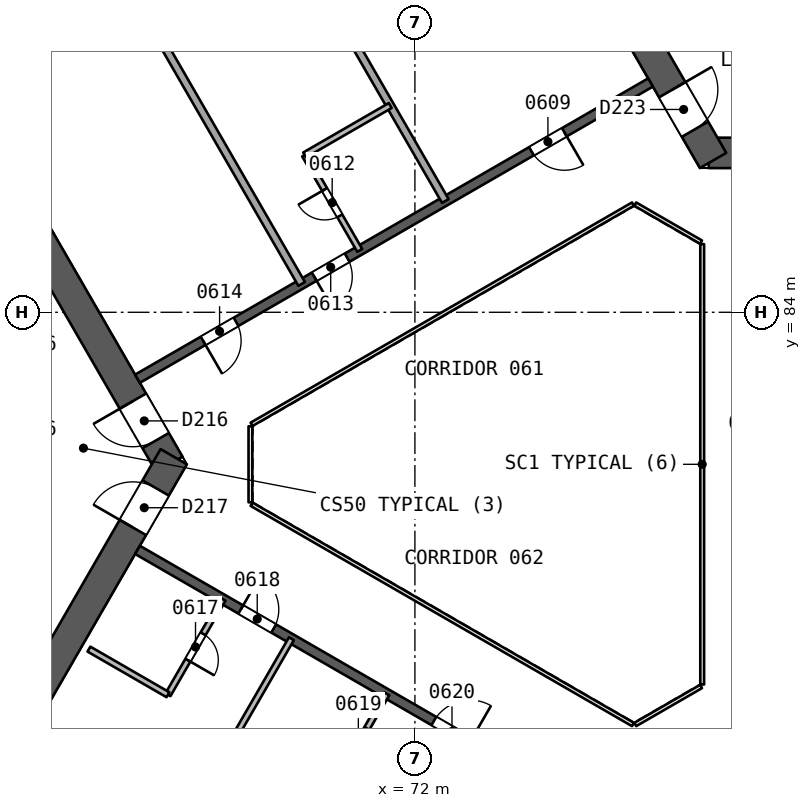
"""IFC4 building model, lengths in metres.
Left out: names, types, materials, properties, quantities, classifications, styles, units other than length and angle.
Written with IfcOpenShell. Run it as: python <this file> out.ifc"""

import sys

from ifc_helpers import new_model, si_unit, direction, frame, frame_2d, origin, place, context, subcontext, project, spatial, rectangle, extrude, element, fill, save


model = new_model("IFC4")
c1 = context("Model", 3, precision=1e-05, world=origin(), true_north=direction((0.0, 1.0)))
c2 = subcontext(c1, "Body", "Model", "MODEL_VIEW")
j1 = project(units=[si_unit("LENGTHUNIT", "METRE"), si_unit("PLANEANGLEUNIT", "RADIAN")], contexts=[c1])
p1 = place(None, origin())
s1 = spatial("IfcSite", under=j1, at=p1, CompositionType="ELEMENT")
p2 = place(p1, origin())
s2 = spatial("IfcBuilding", under=s1, at=p2, CompositionType="ELEMENT")
p3 = place(p2, frame((0.0, 0.0, 33.7)))
s3 = spatial("IfcBuildingStorey", under=s2, at=p3, CompositionType="ELEMENT", Elevation=33.7)
p4 = place(p3, frame((65.538, 80.0, 0.0), z_axis=(0.0, 0.0, 1.0), x_axis=(-0.49999662545, 0.866027352073, 0.0)))
e1 = element("IfcWall", 1, at=p4, inside=s3, PredefinedType="SHEAR", context=c2, shape_type="SweptSolid", body=[
    extrude(rectangle(XDim=10.149, YDim=0.8, at=frame_2d((5.074, 0.0))), origin(), (0.0, 0.0, 1.0), 3.7),
])
p5 = place(p4, frame((0.719, 0.0, 0.0)))
e2 = element("IfcOpeningElement", 2, at=p5, cuts=e1, PredefinedType="OPENING", context=c2, shape_type="SweptSolid", body=[
    extrude(rectangle(XDim=1.2, YDim=2.1, at=frame_2d((0.6, 1.05))), frame((0.0, 0.411, 0.0), z_axis=(0.0, -1.0, 0.0), x_axis=(1.0, 0.0, 0.0)), (0.0, 0.0, 1.0), 0.821),
])
p6 = place(p3, frame((60.664, 71.557, 0.0), z_axis=(0.0, 0.0, 1.0), x_axis=(0.50000409368, 0.866023040284, 0.0)))
e3 = element("IfcWall", 3, at=p6, inside=s3, PredefinedType="SHEAR", context=c2, shape_type="SweptSolid", body=[
    extrude(rectangle(XDim=9.98, YDim=0.8, at=frame_2d((4.99, 0.0))), origin(), (0.0, 0.0, 1.0), 3.7),
])
p7 = place(p6, frame((7.83, 0.0, 0.0)))
e4 = element("IfcOpeningElement", 4, at=p7, cuts=e3, PredefinedType="OPENING", context=c2, shape_type="SweptSolid", body=[
    extrude(rectangle(XDim=1.2, YDim=2.1, at=frame_2d((0.6, 1.05))), frame((0.0, 0.411, 0.0), z_axis=(0.0, -1.0, 0.0), x_axis=(1.0, 0.0, 0.0)), (0.0, 0.0, 1.0), 0.821),
])
p8 = place(p3, frame((79.731, 88.194, 0.0), z_axis=(0.0, 0.0, 1.0), x_axis=(1.0, 0.0, 0.0)))
e5 = element("IfcWall", 5, at=p8, inside=s3, PredefinedType="SHEAR", context=c2, shape_type="SweptSolid", body=[
    extrude(rectangle(XDim=10.149, YDim=0.8, at=frame_2d((5.074, 0.0))), origin(), (0.0, 0.0, 1.0), 3.7),
])
p9 = place(p8, frame((0.719, 0.0, 0.0)))
e6 = element("IfcOpeningElement", 6, at=p9, cuts=e5, PredefinedType="OPENING", context=c2, shape_type="SweptSolid", body=[
    extrude(rectangle(XDim=1.2, YDim=2.1, at=frame_2d((0.6, 1.05))), frame((0.0, 0.411, 0.0), z_axis=(0.0, -1.0, 0.0), x_axis=(1.0, 0.0, 0.0)), (0.0, 0.0, 1.0), 0.821),
])
p10 = place(p3, frame((74.856, 96.637, 0.0), z_axis=(0.0, 0.0, 1.0), x_axis=(0.499993500917, -0.866029155999, 0.0)))
e7 = element("IfcWall", 7, at=p10, inside=s3, PredefinedType="SHEAR", context=c2, shape_type="SweptSolid", body=[
    extrude(rectangle(XDim=9.98, YDim=0.8, at=frame_2d((4.99, 0.0))), origin(), (0.0, 0.0, 1.0), 3.7),
])
p11 = place(p10, frame((7.83, 0.0, 0.0)))
e8 = element("IfcOpeningElement", 8, at=p11, cuts=e7, PredefinedType="OPENING", context=c2, shape_type="SweptSolid", body=[
    extrude(rectangle(XDim=1.2, YDim=2.1, at=frame_2d((0.6, 1.05))), frame((0.0, 0.411, 0.0), z_axis=(0.0, -1.0, 0.0), x_axis=(1.0, 0.0, 0.0)), (0.0, 0.0, 1.0), 0.821),
])
p12 = place(p3, frame((78.2, 90.046, 0.0), z_axis=(0.0, 0.0, 1.0), x_axis=(-0.866026492143, -0.499998114903, 0.0)))
e9 = element("IfcWall", 9, at=p12, inside=s3, PredefinedType="SHEAR", context=c2, shape_type="SweptSolid", body=[
    extrude(rectangle(XDim=15.588, YDim=0.25, at=frame_2d((7.794, 0.0))), origin(), (0.0, 0.0, 1.0), 3.2),
])
p13 = place(p12, frame((2.618, 0.0, 0.0)))
e10 = element("IfcOpeningElement", 10, at=p13, cuts=e9, PredefinedType="OPENING", context=c2, shape_type="SweptSolid", body=[
    extrude(rectangle(XDim=1.0, YDim=2.1, at=frame_2d((0.5, 1.05))), frame((0.0, 0.135, 0.0), z_axis=(0.0, -1.0, 0.0), x_axis=(1.0, 0.0, 0.0)), (0.0, 0.0, 1.0), 0.271),
])
p14 = place(p12, frame((9.218, 0.0, 0.0)))
e11 = element("IfcOpeningElement", 11, at=p14, cuts=e9, PredefinedType="OPENING", context=c2, shape_type="SweptSolid", body=[
    extrude(rectangle(XDim=1.0, YDim=2.1, at=frame_2d((0.5, 1.05))), frame((0.0, 0.135, 0.0), z_axis=(0.0, -1.0, 0.0), x_axis=(1.0, 0.0, 0.0)), (0.0, 0.0, 1.0), 0.271),
])
p15 = place(p12, frame((12.594, 0.0, 0.0)))
e12 = element("IfcOpeningElement", 12, at=p15, cuts=e9, PredefinedType="OPENING", context=c2, shape_type="SweptSolid", body=[
    extrude(rectangle(XDim=1.0, YDim=2.1, at=frame_2d((0.5, 1.05))), frame((0.0, 0.135, 0.0), z_axis=(0.0, -1.0, 0.0), x_axis=(1.0, 0.0, 0.0)), (0.0, 0.0, 1.0), 0.271),
])
p16 = place(p3, frame((64.7, 77.748, 0.0), z_axis=(0.0, 0.0, 1.0), x_axis=(0.866026492143, -0.499998114903, 0.0)))
e13 = element("IfcWall", 13, at=p16, inside=s3, PredefinedType="SHEAR", context=c2, shape_type="SweptSolid", body=[
    extrude(rectangle(XDim=15.588, YDim=0.25, at=frame_2d((7.794, 0.0))), origin(), (0.0, 0.0, 1.0), 3.2),
])
p17 = place(p16, frame((3.138, 0.0, 0.0)))
e14 = element("IfcOpeningElement", 14, at=p17, cuts=e13, PredefinedType="OPENING", context=c2, shape_type="SweptSolid", body=[
    extrude(rectangle(XDim=1.0, YDim=2.1, at=frame_2d((0.5, 1.05))), frame((0.0, 0.135, 0.0), z_axis=(0.0, -1.0, 0.0), x_axis=(1.0, 0.0, 0.0)), (0.0, 0.0, 1.0), 0.271),
])
p18 = place(p16, frame((9.006, 0.0, 0.0)))
e15 = element("IfcOpeningElement", 15, at=p18, cuts=e13, PredefinedType="OPENING", context=c2, shape_type="SweptSolid", body=[
    extrude(rectangle(XDim=1.1, YDim=2.1, at=frame_2d((0.55, 1.05))), frame((0.0, 0.135, 0.0), z_axis=(0.0, -1.0, 0.0), x_axis=(1.0, 0.0, 0.0)), (0.0, 0.0, 1.0), 0.271),
])
p19 = place(p16, frame((11.762, 0.0, 0.0)))
e16 = element("IfcOpeningElement", 16, at=p19, cuts=e13, PredefinedType="OPENING", context=c2, shape_type="SweptSolid", body=[
    extrude(rectangle(XDim=1.0, YDim=2.1, at=frame_2d((0.5, 1.05))), frame((0.0, 0.135, 0.0), z_axis=(0.0, -1.0, 0.0), x_axis=(1.0, 0.0, 0.0)), (0.0, 0.0, 1.0), 0.271),
])
p20 = place(p3, frame((65.712, 99.205, 0.0), z_axis=(0.0, 0.0, 1.0), x_axis=(0.499997249004, -0.866026992067, 0.0)))
e17 = element("IfcWall", 17, at=p20, inside=s3, PredefinedType="PARTITIONING", context=c2, shape_type="SweptSolid", body=[
    extrude(rectangle(XDim=14.176, YDim=0.2, at=frame_2d((7.088, 0.0))), origin(), (0.0, 0.0, 1.0), 3.2),
])
p21 = place(p3, frame((70.548, 85.628, 0.0), z_axis=(0.0, 0.0, 1.0), x_axis=(-0.499987231761, 0.866032775405, 0.0)))
e18 = element("IfcWall", 18, at=p21, inside=s3, PredefinedType="PARTITIONING", context=c2, shape_type="SweptSolid", body=[
    extrude(rectangle(XDim=2.9, YDim=0.15, at=frame_2d((1.45, 0.0))), origin(), (0.0, 0.0, 1.0), 3.2),
])
p22 = place(p21, frame((1.05, 0.0, 0.0)))
e19 = element("IfcOpeningElement", 19, at=p22, cuts=e18, PredefinedType="OPENING", context=c2, shape_type="SweptSolid", body=[
    extrude(rectangle(XDim=0.8, YDim=2.1, at=frame_2d((0.4, 1.05))), frame((0.0, 0.085, 0.0), z_axis=(0.0, -1.0, 0.0), x_axis=(1.0, 0.0, 0.0)), (0.0, 0.0, 1.0), 0.171),
])
p23 = place(p3, frame((69.098, 88.14, 0.0), z_axis=(0.0, 0.0, 1.0), x_axis=(0.866021400173, 0.500006934395, 0.0)))
e20 = element("IfcWall", 20, at=p23, inside=s3, PredefinedType="PARTITIONING", context=c2, shape_type="SweptSolid", body=[
    extrude(rectangle(XDim=2.6, YDim=0.15, at=frame_2d((1.3, 0.0))), origin(), (0.0, 0.0, 1.0), 3.2),
])
p24 = place(p3, frame((61.932, 97.023, 0.0), z_axis=(0.0, 0.0, 1.0), x_axis=(0.499997249004, -0.866026992067, 0.0)))
e21 = element("IfcWall", 21, at=p24, inside=s3, PredefinedType="PARTITIONING", context=c2, shape_type="SweptSolid", body=[
    extrude(rectangle(XDim=14.176, YDim=0.2, at=frame_2d((7.088, 0.0))), origin(), (0.0, 0.0, 1.0), 3.2),
])
p25 = place(p3, frame((66.952, 76.448, 0.0), z_axis=(0.0, 0.0, 1.0), x_axis=(-0.499987231761, -0.866032775405, 0.0)))
e22 = element("IfcWall", 22, at=p25, inside=s3, PredefinedType="PARTITIONING", context=c2, shape_type="SweptSolid", body=[
    extrude(rectangle(XDim=2.9, YDim=0.15, at=frame_2d((1.45, 0.0))), origin(), (0.0, 0.0, 1.0), 3.2),
])
p26 = place(p25, frame((1.05, 0.0, 0.0)))
e23 = element("IfcOpeningElement", 23, at=p26, cuts=e22, PredefinedType="OPENING", context=c2, shape_type="SweptSolid", body=[
    extrude(rectangle(XDim=0.8, YDim=2.1, at=frame_2d((0.4, 1.05))), frame((0.0, 0.085, 0.0), z_axis=(0.0, -1.0, 0.0), x_axis=(1.0, 0.0, 0.0)), (0.0, 0.0, 1.0), 0.171),
])
p27 = place(p3, frame((65.502, 73.937, 0.0), z_axis=(0.0, 0.0, 1.0), x_axis=(-0.865994240961, 0.500053971709, 0.0)))
e24 = element("IfcWall", 24, at=p27, inside=s3, PredefinedType="PARTITIONING", context=c2, shape_type="SweptSolid", body=[
    extrude(rectangle(XDim=2.401, YDim=0.15, at=frame_2d((1.201, 0.0))), origin(), (0.0, 0.0, 1.0), 3.2),
])
p28 = place(p3, frame((67.25, 72.812, 0.0), z_axis=(0.0, 0.0, 1.0), x_axis=(0.499990139034, 0.866031096941, 0.0)))
e25 = element("IfcWall", 25, at=p28, inside=s3, PredefinedType="PARTITIONING", context=c2, shape_type="SweptSolid", body=[
    extrude(rectangle(XDim=3.0, YDim=0.15, at=frame_2d((1.5, 0.0))), origin(), (0.0, 0.0, 1.0), 3.2),
])
p29 = place(p3, frame((71.261, 73.96, 0.0), z_axis=(0.0, 0.0, 1.0), x_axis=(-0.50002537861, -0.866010750942, 0.0)))
e26 = element("IfcWall", 26, at=p29, inside=s3, PredefinedType="PARTITIONING", context=c2, shape_type="SweptSolid", body=[
    extrude(rectangle(XDim=3.0, YDim=0.15, at=frame_2d((1.5, 0.0))), origin(), (0.0, 0.0, 1.0), 3.2),
])
p30 = place(p29, frame((1.05, 0.0, 0.0)))
e27 = element("IfcOpeningElement", 27, at=p30, cuts=e26, PredefinedType="OPENING", context=c2, shape_type="SweptSolid", body=[
    extrude(rectangle(XDim=0.9, YDim=2.1, at=frame_2d((0.45, 1.05))), frame((0.0, 0.085, 0.0), z_axis=(0.0, -1.0, 0.0), x_axis=(1.0, 0.0, 0.0)), (0.0, 0.0, 1.0), 0.171),
])
p31 = place(p3, frame((37.61, 83.152, 0.0), z_axis=(0.0, 0.0, 1.0), x_axis=(0.866024438126, 0.500001672566, 0.0)))
e28 = element("IfcWall", 28, at=p31, inside=s3, PredefinedType="SOLIDWALL", context=c2, shape_type="SweptSolid", body=[
    extrude(rectangle(XDim=61.61, YDim=0.3, at=frame_2d((30.805, 0.0))), origin(), (0.0, 0.0, 1.0), 3.2),
])
p32 = place(p31, frame((34.281, 0.0, 0.0)))
e29 = element("IfcOpeningElement", 29, at=p32, cuts=e28, PredefinedType="OPENING", context=c2, shape_type="SweptSolid", body=[
    extrude(rectangle(XDim=2.4, YDim=2.4, at=frame_2d((1.2, 1.2))), frame((0.0, 0.161, 0.0), z_axis=(0.0, -1.0, 0.0), x_axis=(1.0, 0.0, 0.0)), (0.0, 0.0, 1.0), 0.321),
])
p33 = place(p31, frame((47.767, 0.0, 0.0)))
e30 = element("IfcOpeningElement", 30, at=p33, cuts=e28, PredefinedType="OPENING", context=c2, shape_type="SweptSolid", body=[
    extrude(rectangle(XDim=2.4, YDim=2.4, at=frame_2d((1.2, 1.2))), frame((0.0, 0.161, 0.0), z_axis=(0.0, -1.0, 0.0), x_axis=(1.0, 0.0, 0.0)), (0.0, 0.0, 1.0), 0.321),
])
p34 = place(p31, frame((24.305, 0.0, 0.0)))
e31 = element("IfcOpeningElement", 31, at=p34, cuts=e28, PredefinedType="OPENING", context=c2, shape_type="SweptSolid", body=[
    extrude(rectangle(XDim=2.4, YDim=2.4, at=frame_2d((1.2, 1.2))), frame((0.0, 0.161, 0.0), z_axis=(0.0, -1.0, 0.0), x_axis=(1.0, 0.0, 0.0)), (0.0, 0.0, 1.0), 0.321),
])
p35 = place(p31, frame((11.402, 0.0, 0.0)))
e32 = element("IfcOpeningElement", 32, at=p35, cuts=e28, PredefinedType="OPENING", context=c2, shape_type="SweptSolid", body=[
    extrude(rectangle(XDim=2.4, YDim=2.4, at=frame_2d((1.2, 1.2))), frame((0.0, 0.161, 0.0), z_axis=(0.0, -1.0, 0.0), x_axis=(1.0, 0.0, 0.0)), (0.0, 0.0, 1.0), 0.321),
])
p36 = place(p31, frame((28.981, 0.0, 0.0)))
e33 = element("IfcOpeningElement", 33, at=p36, cuts=e28, PredefinedType="OPENING", context=c2, shape_type="SweptSolid", body=[
    extrude(rectangle(XDim=2.4, YDim=2.4, at=frame_2d((1.2, 1.2))), frame((0.0, 0.161, 0.0), z_axis=(0.0, -1.0, 0.0), x_axis=(1.0, 0.0, 0.0)), (0.0, 0.0, 1.0), 0.321),
])
p37 = place(p3, frame((90.965, 46.043, 0.0), z_axis=(0.0, 0.0, 1.0), x_axis=(-0.866024438126, 0.500001672566, 0.0)))
e34 = element("IfcWall", 34, at=p37, inside=s3, PredefinedType="SOLIDWALL", context=c2, shape_type="SweptSolid", body=[
    extrude(rectangle(XDim=61.61, YDim=0.3, at=frame_2d((30.805, 0.0))), origin(), (0.0, 0.0, 1.0), 3.2),
])
p38 = place(p37, frame((29.293, 0.0, 0.0)))
e35 = element("IfcOpeningElement", 35, at=p38, cuts=e34, PredefinedType="OPENING", context=c2, shape_type="SweptSolid", body=[
    extrude(rectangle(XDim=2.4, YDim=2.4, at=frame_2d((1.2, 1.2))), frame((0.0, 0.161, 0.0), z_axis=(0.0, -1.0, 0.0), x_axis=(1.0, 0.0, 0.0)), (0.0, 0.0, 1.0), 0.321),
])
p39 = place(p37, frame((46.61, 0.0, 0.0)))
e36 = element("IfcOpeningElement", 36, at=p39, cuts=e34, PredefinedType="OPENING", context=c2, shape_type="SweptSolid", body=[
    extrude(rectangle(XDim=2.4, YDim=2.4, at=frame_2d((1.2, 1.2))), frame((0.0, 0.161, 0.0), z_axis=(0.0, -1.0, 0.0), x_axis=(1.0, 0.0, 0.0)), (0.0, 0.0, 1.0), 0.321),
])
p40 = place(p37, frame((12.289, 0.0, 0.0)))
e37 = element("IfcOpeningElement", 37, at=p40, cuts=e34, PredefinedType="OPENING", context=c2, shape_type="SweptSolid", body=[
    extrude(rectangle(XDim=2.4, YDim=2.4, at=frame_2d((1.2, 1.2))), frame((0.0, 0.161, 0.0), z_axis=(0.0, -1.0, 0.0), x_axis=(1.0, 0.0, 0.0)), (0.0, 0.0, 1.0), 0.321),
])
p41 = place(p3, frame((86.77, 89.486, 0.0), z_axis=(0.0, 0.0, 1.0), x_axis=(-0.86601811187, 0.500012629753, 0.0)))
e38 = element("IfcWall", 38, at=p41, inside=s3, PredefinedType="SOLIDWALL", context=c2, shape_type="SweptSolid", body=[
    extrude(rectangle(XDim=10.9, YDim=0.2, at=frame_2d((5.45, 0.0))), origin(), (0.0, 0.0, 1.0), 3.2),
])
p42 = place(p3, frame((79.56, 74.206, 0.0), z_axis=(0.0, 0.0, 1.0), x_axis=(0.0, 1.0, 0.0)))
e39 = element("IfcWall", 39, at=p42, inside=s3, PredefinedType="PARTITIONING", context=c2, shape_type="SweptSolid", body=[
    extrude(rectangle(XDim=11.588, YDim=0.1, at=frame_2d((5.794, 0.0))), origin(), (0.0, 0.0, 1.0), 3.2),
])
p43 = place(p3, frame((79.53, 85.846, 0.0), z_axis=(0.0, 0.0, 1.0), x_axis=(-0.866041268327, 0.499972520799, 0.0)))
e40 = element("IfcWall", 40, at=p43, inside=s3, PredefinedType="PARTITIONING", context=c2, shape_type="SweptSolid", body=[
    extrude(rectangle(XDim=2.0, YDim=0.1, at=frame_2d((1.0, 0.0))), origin(), (0.0, 0.0, 1.0), 3.2),
])
p44 = place(p3, frame((77.738, 86.846, 0.0), z_axis=(0.0, 0.0, 1.0), x_axis=(-0.866026658274, -0.499997827154, 0.0)))
e41 = element("IfcWall", 41, at=p44, inside=s3, PredefinedType="PARTITIONING", context=c2, shape_type="SweptSolid", body=[
    extrude(rectangle(XDim=11.588, YDim=0.1, at=frame_2d((5.794, 0.0))), origin(), (0.0, 0.0, 1.0), 3.2),
])
p45 = place(p3, frame((67.672, 81.0, 0.0), z_axis=(0.0, 0.0, 1.0), x_axis=(0.0, -1.0, 0.0)))
e42 = element("IfcWall", 42, at=p45, inside=s3, PredefinedType="PARTITIONING", context=c2, shape_type="SweptSolid", body=[
    extrude(rectangle(XDim=2.0, YDim=0.1, at=frame_2d((1.0, 0.0))), origin(), (0.0, 0.0, 1.0), 3.2),
])
p46 = place(p3, frame((67.702, 78.948, 0.0), z_axis=(0.0, 0.0, 1.0), x_axis=(0.866026658274, -0.499997827154, 0.0)))
e43 = element("IfcWall", 43, at=p46, inside=s3, PredefinedType="PARTITIONING", context=c2, shape_type="SweptSolid", body=[
    extrude(rectangle(XDim=11.588, YDim=0.1, at=frame_2d((5.794, 0.0))), origin(), (0.0, 0.0, 1.0), 3.2),
])
p47 = place(p3, frame((77.798, 73.154, 0.0), z_axis=(0.0, 0.0, 1.0), x_axis=(0.866041268327, 0.499972520799, 0.0)))
e44 = element("IfcWall", 44, at=p47, inside=s3, PredefinedType="PARTITIONING", context=c2, shape_type="SweptSolid", body=[
    extrude(rectangle(XDim=2.0, YDim=0.1, at=frame_2d((1.0, 0.0))), origin(), (0.0, 0.0, 1.0), 3.2),
])
p48 = place(p13, origin())
e45 = element("IfcDoor", 45, at=p48, inside=s3, OperationType="SINGLE_SWING_LEFT", PredefinedType="NOTDEFINED", context=c2, shape_type="SweptSolid", body=[
    extrude(rectangle(XDim=1.0, YDim=2.1, at=frame_2d((0.5, 1.05))), frame((0.0, 0.025, 0.0), z_axis=(0.0, -1.0, 0.0), x_axis=(1.0, 0.0, 0.0)), (0.0, 0.0, 1.0), 0.05),
])
fill(e10, e45)
p49 = place(p22, origin())
e46 = element("IfcDoor", 46, at=p49, inside=s3, OperationType="SINGLE_SWING_RIGHT", PredefinedType="NOTDEFINED", context=c2, shape_type="SweptSolid", body=[
    extrude(rectangle(XDim=0.8, YDim=2.1, at=frame_2d((0.4, 1.05))), frame((0.0, 0.025, 0.0), z_axis=(0.0, -1.0, 0.0), x_axis=(1.0, 0.0, 0.0)), (0.0, 0.0, 1.0), 0.05),
])
fill(e19, e46)
p50 = place(p14, origin())
e47 = element("IfcDoor", 47, at=p50, inside=s3, OperationType="SINGLE_SWING_RIGHT", PredefinedType="NOTDEFINED", context=c2, shape_type="SweptSolid", body=[
    extrude(rectangle(XDim=1.0, YDim=2.1, at=frame_2d((0.5, 1.05))), frame((0.0, 0.025, 0.0), z_axis=(0.0, -1.0, 0.0), x_axis=(1.0, 0.0, 0.0)), (0.0, 0.0, 1.0), 0.05),
])
fill(e11, e47)
p51 = place(p15, origin())
e48 = element("IfcDoor", 48, at=p51, inside=s3, OperationType="SINGLE_SWING_RIGHT", PredefinedType="NOTDEFINED", context=c2, shape_type="SweptSolid", body=[
    extrude(rectangle(XDim=1.0, YDim=2.1, at=frame_2d((0.5, 1.05))), frame((0.0, 0.025, 0.0), z_axis=(0.0, -1.0, 0.0), x_axis=(1.0, 0.0, 0.0)), (0.0, 0.0, 1.0), 0.05),
])
fill(e12, e48)
p52 = place(p26, origin())
e49 = element("IfcDoor", 49, at=p52, inside=s3, OperationType="SINGLE_SWING_RIGHT", PredefinedType="NOTDEFINED", context=c2, shape_type="SweptSolid", body=[
    extrude(rectangle(XDim=0.8, YDim=2.1, at=frame_2d((0.4, 1.05))), frame((0.0, 0.025, 0.0), z_axis=(0.0, -1.0, 0.0), x_axis=(1.0, 0.0, 0.0)), (0.0, 0.0, 1.0), 0.05),
])
fill(e23, e49)
p53 = place(p17, origin())
e50 = element("IfcDoor", 50, at=p53, inside=s3, OperationType="SINGLE_SWING_LEFT", PredefinedType="NOTDEFINED", context=c2, shape_type="SweptSolid", body=[
    extrude(rectangle(XDim=1.0, YDim=2.1, at=frame_2d((0.5, 1.05))), frame((0.0, 0.025, 0.0), z_axis=(0.0, -1.0, 0.0), x_axis=(1.0, 0.0, 0.0)), (0.0, 0.0, 1.0), 0.05),
])
fill(e14, e50)
p54 = place(p30, origin())
e51 = element("IfcDoor", 51, at=p54, inside=s3, OperationType="SINGLE_SWING_RIGHT", PredefinedType="NOTDEFINED", context=c2, shape_type="SweptSolid", body=[
    extrude(rectangle(XDim=0.9, YDim=2.1, at=frame_2d((0.45, 1.05))), frame((0.0, 0.025, 0.0), z_axis=(0.0, -1.0, 0.0), x_axis=(1.0, 0.0, 0.0)), (0.0, 0.0, 1.0), 0.05),
])
fill(e27, e51)
p55 = place(p18, origin())
e52 = element("IfcDoor", 52, at=p55, inside=s3, OperationType="SINGLE_SWING_RIGHT", PredefinedType="NOTDEFINED", context=c2, shape_type="SweptSolid", body=[
    extrude(rectangle(XDim=1.1, YDim=2.1, at=frame_2d((0.55, 1.05))), frame((0.0, 0.025, 0.0), z_axis=(0.0, -1.0, 0.0), x_axis=(1.0, 0.0, 0.0)), (0.0, 0.0, 1.0), 0.05),
])
fill(e15, e52)
p56 = place(p5, origin())
e53 = element("IfcDoor", 53, at=p56, inside=s3, OperationType="SINGLE_SWING_RIGHT", PredefinedType="NOTDEFINED", context=c2, shape_type="SweptSolid", body=[
    extrude(rectangle(XDim=1.2, YDim=2.1, at=frame_2d((0.6, 1.05))), frame((0.0, 0.025, 0.0), z_axis=(0.0, -1.0, 0.0), x_axis=(1.0, 0.0, 0.0)), (0.0, 0.0, 1.0), 0.05),
])
fill(e2, e53)
p57 = place(p7, origin())
e54 = element("IfcDoor", 54, at=p57, inside=s3, OperationType="SINGLE_SWING_LEFT", PredefinedType="NOTDEFINED", context=c2, shape_type="SweptSolid", body=[
    extrude(rectangle(XDim=1.2, YDim=2.1, at=frame_2d((0.6, 1.05))), frame((0.0, 0.025, 0.0), z_axis=(0.0, -1.0, 0.0), x_axis=(1.0, 0.0, 0.0)), (0.0, 0.0, 1.0), 0.05),
])
fill(e4, e54)
p58 = place(p11, origin())
e55 = element("IfcDoor", 55, at=p58, inside=s3, OperationType="SINGLE_SWING_LEFT", PredefinedType="NOTDEFINED", context=c2, shape_type="SweptSolid", body=[
    extrude(rectangle(XDim=1.2, YDim=2.1, at=frame_2d((0.6, 1.05))), frame((0.0, 0.025, 0.0), z_axis=(0.0, -1.0, 0.0), x_axis=(1.0, 0.0, 0.0)), (0.0, 0.0, 1.0), 0.05),
])
fill(e8, e55)
save(model, sys.argv[1])
